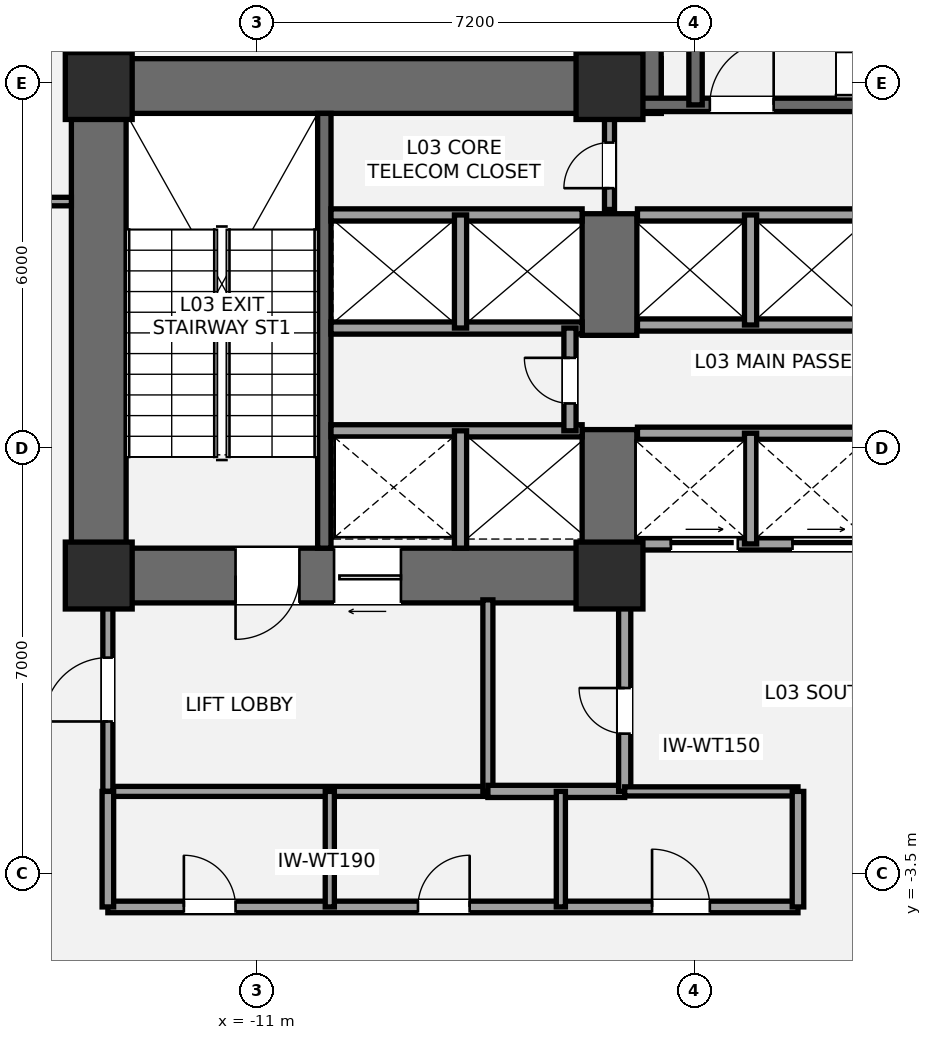
"""IFC4 building model, lengths in metres.
Left out: names, types, materials, properties, quantities, classifications, styles, units other than length and angle.
Written with IfcOpenShell. Run it as: python <this file> out.ifc"""

import sys

from ifc_helpers import new_model, si_unit, direction, frame, frame_2d, origin, origin_2d, place, context, subcontext, project, spatial, rectangle, extrude, element, fill, save


model = new_model("IFC4")
c1 = context("Model", 3, precision=1e-05, world=origin(), true_north=direction((0.0, 1.0)))
c2 = subcontext(c1, "Body", "Model", "MODEL_VIEW")
j1 = project(units=[si_unit("LENGTHUNIT", "METRE"), si_unit("PLANEANGLEUNIT", "RADIAN")], contexts=[c1])
p1 = place(None, origin())
s1 = spatial("IfcSite", under=j1, at=p1, CompositionType="ELEMENT")
p2 = place(p1, origin())
s2 = spatial("IfcBuilding", under=s1, at=p2, CompositionType="ELEMENT")
p3 = place(p2, frame((0.0, 0.0, 14.4)))
s3 = spatial("IfcBuildingStorey", under=s2, at=p3, CompositionType="ELEMENT", Elevation=14.4)
p4 = place(p3, frame((-13.6, 0.95, 0.0), z_axis=(0.0, 0.0, 1.0), x_axis=(0.0, 1.0, 0.0)))
e1 = element("IfcWall", 1, at=p4, inside=s3, PredefinedType="SHEAR", context=c2, shape_type="SweptSolid", body=[
    extrude(rectangle(XDim=8.95, YDim=0.9, at=frame_2d((4.475, 0.0))), origin(), (0.0, 0.0, 1.0), 4.2),
])
p5 = place(p3, frame((-14.05, 9.45, 0.0), z_axis=(0.0, 0.0, 1.0), x_axis=(1.0, 0.0, 0.0)))
e2 = element("IfcWall", 2, at=p5, inside=s3, PredefinedType="SHEAR", context=c2, shape_type="SweptSolid", body=[
    extrude(rectangle(XDim=9.7, YDim=0.9, at=frame_2d((4.85, 0.0))), origin(), (0.0, 0.0, 1.0), 4.2),
])
p6 = place(p3, frame((-4.75, 1.4, 0.0), z_axis=(0.0, 0.0, 1.0), x_axis=(-1.0, 0.0, 0.0)))
e3 = element("IfcWall", 3, at=p6, inside=s3, PredefinedType="SHEAR", context=c2, shape_type="SweptSolid", body=[
    extrude(rectangle(XDim=9.3, YDim=0.9, at=frame_2d((4.65, 0.0))), origin(), (0.0, 0.0, 1.0), 4.2),
])
p7 = place(p6, frame((5.55, 0.0, 0.0)))
e4 = element("IfcOpeningElement", 4, at=p7, cuts=e3, PredefinedType="OPENING", context=c2, shape_type="SweptSolid", body=[
    extrude(rectangle(XDim=1.05, YDim=2.15, at=frame_2d((0.525, 1.075))), frame((0.0, 0.46, 0.0), z_axis=(0.0, -1.0, 0.0), x_axis=(1.0, 0.0, 0.0)), (0.0, 0.0, 1.0), 0.92),
])
p8 = place(p6, frame((3.88, 0.0, 0.0)))
e5 = element("IfcOpeningElement", 5, at=p8, cuts=e3, PredefinedType="OPENING", context=c2, shape_type="SweptSolid", body=[
    extrude(rectangle(XDim=1.1, YDim=2.2, at=frame_2d((0.55, 1.1))), frame((0.0, 0.46, 0.0), z_axis=(0.0, -1.0, 0.0), x_axis=(1.0, 0.0, 0.0)), (0.0, 0.0, 1.0), 0.92),
])
p9 = place(p3, frame((-5.2, 0.95, 0.0), z_axis=(0.0, 0.0, 1.0), x_axis=(0.0, 1.0, 0.0)))
e6 = element("IfcWall", 6, at=p9, inside=s3, PredefinedType="SHEAR", context=c2, shape_type="SweptSolid", body=[
    extrude(rectangle(XDim=2.85, YDim=0.9, at=frame_2d((1.425, 0.0))), origin(), (0.0, 0.0, 1.0), 4.2),
])
p10 = place(p3, frame((-5.2, 5.35, 0.0), z_axis=(0.0, 0.0, 1.0), x_axis=(0.0, 1.0, 0.0)))
e7 = element("IfcWall", 7, at=p10, inside=s3, PredefinedType="SHEAR", context=c2, shape_type="SweptSolid", body=[
    extrude(rectangle(XDim=2.0, YDim=0.9, at=frame_2d((1.0, 0.0))), origin(), (0.0, 0.0, 1.0), 4.2),
])
p11 = place(p3, frame((-9.89, 1.85, 0.0), z_axis=(0.0, 0.0, 1.0), x_axis=(0.0, 1.0, 0.0)))
e8 = element("IfcWall", 8, at=p11, inside=s3, PredefinedType="SHEAR", context=c2, shape_type="SweptSolid", body=[
    extrude(rectangle(XDim=7.15, YDim=0.22, at=frame_2d((3.575, 0.0))), origin(), (0.0, 0.0, 1.0), 4.2),
])
p12 = place(p3, frame((-4.8, 9.0, 0.0), z_axis=(0.0, 0.0, 1.0), x_axis=(0.0, 1.0, 0.0)))
e9 = element("IfcWall", 9, at=p12, inside=s3, PredefinedType="SHEAR", context=c2, shape_type="SweptSolid", body=[
    extrude(rectangle(XDim=4.3, YDim=0.9, at=frame_2d((2.15, 0.0))), origin(), (0.0, 0.0, 1.0), 4.2),
])
p13 = place(p3, frame((-4.7, 9.14, 0.0), z_axis=(0.0, 0.0, 1.0), x_axis=(1.0, 0.0, 0.0)))
e10 = element("IfcWall", 10, at=p13, inside=s3, PredefinedType="SHEAR", context=c2, shape_type="SweptSolid", body=[
    extrude(rectangle(XDim=9.3, YDim=0.22, at=frame_2d((4.65, 0.0))), origin(), (0.0, 0.0, 1.0), 4.2),
])
p14 = place(p13, frame((1.15, 0.0, 0.0)))
e11 = element("IfcOpeningElement", 11, at=p14, cuts=e10, PredefinedType="OPENING", context=c2, shape_type="SweptSolid", body=[
    extrude(rectangle(XDim=1.05, YDim=2.15, at=frame_2d((0.525, 1.075))), frame((0.0, 0.12, 0.0), z_axis=(0.0, -1.0, 0.0), x_axis=(1.0, 0.0, 0.0)), (0.0, 0.0, 1.0), 0.24),
])
p15 = place(p3, frame((-3.785, 9.14, 0.0), z_axis=(0.0, 0.0, 1.0), x_axis=(0.0, 1.0, 0.0)))
e12 = element("IfcWall", 12, at=p15, inside=s3, PredefinedType="SHEAR", context=c2, shape_type="SweptSolid", body=[
    extrude(rectangle(XDim=3.26, YDim=0.22, at=frame_2d((1.63, 0.0))), origin(), (0.0, 0.0, 1.0), 4.2),
])
for number, where, z_axis, x_axis in (
    (13, (-13.6, 1.4, 0.0), (0.0, 0.0, 1.0), (1.0, 0.0, 0.0)),
    (14, (-13.6, 9.45, 0.0), (0.0, 0.0, 1.0), (1.0, 0.0, 0.0)),
    (15, (-5.2, 1.4, 0.0), (0.0, 0.0, 1.0), (1.0, 0.0, 0.0)),
    (16, (-5.2, 9.45, 0.0), (0.0, 0.0, 1.0), (1.0, 0.0, 0.0)),
):
    element("IfcColumn", number, at=place(p3, frame(where, z_axis=z_axis, x_axis=x_axis)), inside=s3, PredefinedType="COLUMN", context=c2, shape_type="SweptSolid", body=[
        extrude(rectangle(XDim=1.1, YDim=1.1, at=origin_2d()), origin(), (0.0, 0.0, 1.0), 4.2),
    ])
p16 = place(p3, frame((-13.45, -2.15, 0.0), z_axis=(0.0, 0.0, 1.0), x_axis=(1.0, 0.0, 0.0)))
e17 = element("IfcWall", 17, at=p16, inside=s3, PredefinedType="PARTITIONING", context=c2, shape_type="SweptSolid", body=[
    extrude(rectangle(XDim=6.25, YDim=0.165, at=frame_2d((3.125, 0.0))), origin(), (0.0, 0.0, 1.0), 3.98),
])
p17 = place(p3, frame((-13.45, -2.15, 0.0), z_axis=(0.0, 0.0, 1.0), x_axis=(0.0, 1.0, 0.0)))
e18 = element("IfcWall", 18, at=p17, inside=s3, PredefinedType="PARTITIONING", context=c2, shape_type="SweptSolid", body=[
    extrude(rectangle(XDim=3.15, YDim=0.165, at=frame_2d((1.575, 0.0))), origin(), (0.0, 0.0, 1.0), 3.433),
])
p18 = place(p17, frame((1.15, 0.0, 0.0)))
e19 = element("IfcOpeningElement", 19, at=p18, cuts=e18, PredefinedType="OPENING", context=c2, shape_type="SweptSolid", body=[
    extrude(rectangle(XDim=1.05, YDim=2.15, at=frame_2d((0.525, 1.075))), frame((0.0, 0.093, 0.0), z_axis=(0.0, -1.0, 0.0), x_axis=(1.0, 0.0, 0.0)), (0.0, 0.0, 1.0), 0.185),
])
p19 = place(p3, frame((-7.2, -2.15, 0.0), z_axis=(0.0, 0.0, 1.0), x_axis=(0.0, 1.0, 0.0)))
e20 = element("IfcWall", 20, at=p19, inside=s3, PredefinedType="PARTITIONING", context=c2, shape_type="SweptSolid", body=[
    extrude(rectangle(XDim=3.15, YDim=0.165, at=frame_2d((1.575, 0.0))), origin(), (0.0, 0.0, 1.0), 3.98),
])
p20 = place(p3, frame((-7.2, -2.15, 0.0), z_axis=(0.0, 0.0, 1.0), x_axis=(1.0, 0.0, 0.0)))
e21 = element("IfcWall", 21, at=p20, inside=s3, PredefinedType="SOLIDWALL", context=c2, shape_type="SweptSolid", body=[
    extrude(rectangle(XDim=2.25, YDim=0.2, at=frame_2d((1.125, 0.0))), origin(), (0.0, 0.0, 1.0), 3.98),
])
p21 = place(p3, frame((-4.95, -2.15, 0.0), z_axis=(0.0, 0.0, 1.0), x_axis=(0.0, 1.0, 0.0)))
e22 = element("IfcWall", 22, at=p21, inside=s3, PredefinedType="SOLIDWALL", context=c2, shape_type="SweptSolid", body=[
    extrude(rectangle(XDim=3.15, YDim=0.2, at=frame_2d((1.575, 0.0))), origin(), (0.0, 0.0, 1.0), 3.348),
])
p22 = place(p21, frame((0.95, 0.0, 0.0)))
e23 = element("IfcOpeningElement", 23, at=p22, cuts=e22, PredefinedType="OPENING", context=c2, shape_type="SweptSolid", body=[
    extrude(rectangle(XDim=0.75, YDim=2.1, at=frame_2d((0.375, 1.05))), frame((0.0, 0.11, 0.0), z_axis=(0.0, -1.0, 0.0), x_axis=(1.0, 0.0, 0.0)), (0.0, 0.0, 1.0), 0.22),
])
p23 = place(p3, frame((-9.78, 3.78, 0.0), z_axis=(0.0, 0.0, 1.0), x_axis=(1.0, 0.0, 0.0)))
e24 = element("IfcWall", 24, at=p23, inside=s3, PredefinedType="SOLIDWALL", context=c2, shape_type="SweptSolid", body=[
    extrude(rectangle(XDim=4.13, YDim=0.2, at=frame_2d((2.065, 0.0))), origin(), (0.0, 0.0, 1.0), 3.98),
])
p24 = place(p3, frame((-7.65, 1.85, 0.0), z_axis=(0.0, 0.0, 1.0), x_axis=(0.0, 1.0, 0.0)))
e25 = element("IfcWall", 25, at=p24, inside=s3, PredefinedType="SOLIDWALL", context=c2, shape_type="SweptSolid", body=[
    extrude(rectangle(XDim=1.93, YDim=0.2, at=frame_2d((0.965, 0.0))), origin(), (0.0, 0.0, 1.0), 3.98),
])
for number, where, z_axis, x_axis in (
    (26, (-9.78, 5.47, 0.0), (0.0, 0.0, 1.0), (1.0, 0.0, 0.0)),
    (27, (-9.78, 7.33, 0.0), (0.0, 0.0, 1.0), (1.0, 0.0, 0.0)),
):
    element("IfcWall", number, at=place(p3, frame(where, z_axis=z_axis, x_axis=x_axis)), inside=s3, PredefinedType="SOLIDWALL", context=c2, shape_type="SweptSolid", body=[
        extrude(rectangle(XDim=4.13, YDim=0.2, at=frame_2d((2.065, 0.0))), origin(), (0.0, 0.0, 1.0), 3.98),
    ])
p25 = place(p3, frame((-7.65, 5.47, 0.0), z_axis=(0.0, 0.0, 1.0), x_axis=(0.0, 1.0, 0.0)))
e28 = element("IfcWall", 28, at=p25, inside=s3, PredefinedType="SOLIDWALL", context=c2, shape_type="SweptSolid", body=[
    extrude(rectangle(XDim=1.86, YDim=0.2, at=frame_2d((0.93, 0.0))), origin(), (0.0, 0.0, 1.0), 3.98),
])
p26 = place(p3, frame((-5.85, 3.78, 0.0), z_axis=(0.0, 0.0, 1.0), x_axis=(0.0, 1.0, 0.0)))
e29 = element("IfcWall", 29, at=p26, inside=s3, PredefinedType="SOLIDWALL", context=c2, shape_type="SweptSolid", body=[
    extrude(rectangle(XDim=1.69, YDim=0.2, at=frame_2d((0.845, 0.0))), origin(), (0.0, 0.0, 1.0), 3.98),
])
p27 = place(p26, frame((0.45, 0.0, 0.0)))
e30 = element("IfcOpeningElement", 30, at=p27, cuts=e29, PredefinedType="OPENING", context=c2, shape_type="SweptSolid", body=[
    extrude(rectangle(XDim=0.75, YDim=2.1, at=frame_2d((0.375, 1.05))), frame((0.0, 0.11, 0.0), z_axis=(0.0, -1.0, 0.0), x_axis=(1.0, 0.0, 0.0)), (0.0, 0.0, 1.0), 0.22),
])
p28 = place(p3, frame((-4.74, 1.92, 0.0), z_axis=(0.0, 0.0, 1.0), x_axis=(1.0, 0.0, 0.0)))
e31 = element("IfcWall", 31, at=p28, inside=s3, PredefinedType="SOLIDWALL", context=c2, shape_type="SweptSolid", body=[
    extrude(rectangle(XDim=3.86, YDim=0.2, at=frame_2d((1.93, 0.0))), origin(), (0.0, 0.0, 1.0), 2.97),
])
p29 = place(p28, frame((0.55, 0.0, 0.0)))
e32 = element("IfcOpeningElement", 32, at=p29, cuts=e31, PredefinedType="OPENING", context=c2, shape_type="SweptSolid", body=[
    extrude(rectangle(XDim=1.1, YDim=2.2, at=frame_2d((0.55, 1.1))), frame((0.0, 0.11, 0.0), z_axis=(0.0, -1.0, 0.0), x_axis=(1.0, 0.0, 0.0)), (0.0, 0.0, 1.0), 0.22),
])
p30 = place(p28, frame((2.55, 0.0, 0.0)))
e33 = element("IfcOpeningElement", 33, at=p30, cuts=e31, PredefinedType="OPENING", context=c2, shape_type="SweptSolid", body=[
    extrude(rectangle(XDim=1.1, YDim=2.2, at=frame_2d((0.55, 1.1))), frame((0.0, 0.11, 0.0), z_axis=(0.0, -1.0, 0.0), x_axis=(1.0, 0.0, 0.0)), (0.0, 0.0, 1.0), 0.22),
])
p31 = place(p3, frame((-4.74, 3.74, 0.0), z_axis=(0.0, 0.0, 1.0), x_axis=(1.0, 0.0, 0.0)))
e34 = element("IfcWall", 34, at=p31, inside=s3, PredefinedType="SOLIDWALL", context=c2, shape_type="SweptSolid", body=[
    extrude(rectangle(XDim=3.86, YDim=0.2, at=frame_2d((1.93, 0.0))), origin(), (0.0, 0.0, 1.0), 3.98),
])
p32 = place(p3, frame((-2.88, 1.92, 0.0), z_axis=(0.0, 0.0, 1.0), x_axis=(0.0, 1.0, 0.0)))
e35 = element("IfcWall", 35, at=p32, inside=s3, PredefinedType="SOLIDWALL", context=c2, shape_type="SweptSolid", body=[
    extrude(rectangle(XDim=1.82, YDim=0.2, at=frame_2d((0.91, 0.0))), origin(), (0.0, 0.0, 1.0), 3.98),
])
for number, where, z_axis, x_axis in (
    (36, (-4.74, 5.52, 0.0), (0.0, 0.0, 1.0), (1.0, 0.0, 0.0)),
    (37, (-4.74, 7.33, 0.0), (0.0, 0.0, 1.0), (1.0, 0.0, 0.0)),
):
    element("IfcWall", number, at=place(p3, frame(where, z_axis=z_axis, x_axis=x_axis)), inside=s3, PredefinedType="SOLIDWALL", context=c2, shape_type="SweptSolid", body=[
        extrude(rectangle(XDim=3.86, YDim=0.2, at=frame_2d((1.93, 0.0))), origin(), (0.0, 0.0, 1.0), 3.98),
    ])
p33 = place(p3, frame((-2.88, 5.52, 0.0), z_axis=(0.0, 0.0, 1.0), x_axis=(0.0, 1.0, 0.0)))
e38 = element("IfcWall", 38, at=p33, inside=s3, PredefinedType="SOLIDWALL", context=c2, shape_type="SweptSolid", body=[
    extrude(rectangle(XDim=1.81, YDim=0.2, at=frame_2d((0.905, 0.0))), origin(), (0.0, 0.0, 1.0), 3.98),
])
p34 = place(p3, frame((-5.2, 7.42, 0.0), z_axis=(0.0, 0.0, 1.0), x_axis=(0.0, 1.0, 0.0)))
e39 = element("IfcWall", 39, at=p34, inside=s3, PredefinedType="PARTITIONING", context=c2, shape_type="SweptSolid", body=[
    extrude(rectangle(XDim=1.58, YDim=0.165, at=frame_2d((0.79, 0.0))), origin(), (0.0, 0.0, 1.0), 3.98),
])
p35 = place(p34, frame((0.35, 0.0, 0.0)))
e40 = element("IfcOpeningElement", 40, at=p35, cuts=e39, PredefinedType="OPENING", context=c2, shape_type="SweptSolid", body=[
    extrude(rectangle(XDim=0.75, YDim=2.1, at=frame_2d((0.375, 1.05))), frame((0.0, 0.093, 0.0), z_axis=(0.0, -1.0, 0.0), x_axis=(1.0, 0.0, 0.0)), (0.0, 0.0, 1.0), 0.185),
])
p36 = place(p3, frame((-13.45, -4.05, 0.0), z_axis=(0.0, 0.0, 1.0), x_axis=(1.0, 0.0, 0.0)))
e41 = element("IfcWall", 41, at=p36, inside=s3, PredefinedType="PLUMBINGWALL", context=c2, shape_type="SweptSolid", body=[
    extrude(rectangle(XDim=11.35, YDim=0.19, at=frame_2d((5.675, 0.0))), origin(), (0.0, 0.0, 1.0), 3.507),
])
p37 = place(p36, frame((1.25, 0.0, 0.0)))
e42 = element("IfcOpeningElement", 42, at=p37, cuts=e41, PredefinedType="OPENING", context=c2, shape_type="SweptSolid", body=[
    extrude(rectangle(XDim=0.85, YDim=2.1, at=frame_2d((0.425, 1.05))), frame((0.0, 0.105, 0.0), z_axis=(0.0, -1.0, 0.0), x_axis=(1.0, 0.0, 0.0)), (0.0, 0.0, 1.0), 0.21),
])
p38 = place(p36, frame((5.1, 0.0, 0.0)))
e43 = element("IfcOpeningElement", 43, at=p38, cuts=e41, PredefinedType="OPENING", context=c2, shape_type="SweptSolid", body=[
    extrude(rectangle(XDim=0.85, YDim=2.1, at=frame_2d((0.425, 1.05))), frame((0.0, 0.105, 0.0), z_axis=(0.0, -1.0, 0.0), x_axis=(1.0, 0.0, 0.0)), (0.0, 0.0, 1.0), 0.21),
])
p39 = place(p36, frame((8.95, 0.0, 0.0)))
e44 = element("IfcOpeningElement", 44, at=p39, cuts=e41, PredefinedType="OPENING", context=c2, shape_type="SweptSolid", body=[
    extrude(rectangle(XDim=0.95, YDim=2.15, at=frame_2d((0.475, 1.075))), frame((0.0, 0.105, 0.0), z_axis=(0.0, -1.0, 0.0), x_axis=(1.0, 0.0, 0.0)), (0.0, 0.0, 1.0), 0.21),
])
p40 = place(p3, frame((-4.95, -2.15, 0.0), z_axis=(0.0, 0.0, 1.0), x_axis=(1.0, 0.0, 0.0)))
e45 = element("IfcWall", 45, at=p40, inside=s3, PredefinedType="PLUMBINGWALL", context=c2, shape_type="SweptSolid", body=[
    extrude(rectangle(XDim=2.85, YDim=0.15, at=frame_2d((1.425, 0.0))), origin(), (0.0, 0.0, 1.0), 3.98),
])
for number, where, z_axis, x_axis in (
    (46, (-13.45, -4.05, 0.0), (0.0, 0.0, 1.0), (0.0, 1.0, 0.0)),
    (47, (-2.1, -4.05, 0.0), (0.0, 0.0, 1.0), (0.0, 1.0, 0.0)),
):
    element("IfcWall", number, at=place(p3, frame(where, z_axis=z_axis, x_axis=x_axis)), inside=s3, PredefinedType="PLUMBINGWALL", context=c2, shape_type="SweptSolid", body=[
        extrude(rectangle(XDim=1.9, YDim=0.19, at=frame_2d((0.95, 0.0))), origin(), (0.0, 0.0, 1.0), 3.98),
    ])
p41 = place(p3, frame((-9.8, -4.05, 0.0), z_axis=(0.0, 0.0, 1.0), x_axis=(0.0, 1.0, 0.0)))
e48 = element("IfcWall", 48, at=p41, inside=s3, PredefinedType="PLUMBINGWALL", context=c2, shape_type="SweptSolid", body=[
    extrude(rectangle(XDim=1.9, YDim=0.15, at=frame_2d((0.95, 0.0))), origin(), (0.0, 0.0, 1.0), 3.98),
])
p42 = place(p3, frame((-6.0, -4.05, 0.0), z_axis=(0.0, 0.0, 1.0), x_axis=(0.0, 1.0, 0.0)))
e49 = element("IfcWall", 49, at=p42, inside=s3, PredefinedType="PLUMBINGWALL", context=c2, shape_type="SweptSolid", body=[
    extrude(rectangle(XDim=1.9, YDim=0.15, at=frame_2d((0.95, 0.0))), origin(), (0.0, 0.0, 1.0), 3.348),
])
p43 = place(p3, frame((-18.6, 7.55, 0.0), z_axis=(0.0, 0.0, 1.0), x_axis=(1.0, 0.0, 0.0)))
e50 = element("IfcWall", 50, at=p43, inside=s3, PredefinedType="PARTITIONING", context=c2, shape_type="SweptSolid", body=[
    extrude(rectangle(XDim=4.55, YDim=0.14, at=frame_2d((2.275, 0.0))), origin(), (0.0, 0.0, 1.0), 3.433),
])
p44 = place(p43, frame((0.32, 0.0, 0.0)))
e51 = element("IfcOpeningElement", 51, at=p44, cuts=e50, PredefinedType="OPENING", context=c2, shape_type="SweptSolid", body=[
    extrude(rectangle(XDim=0.92, YDim=2.15, at=frame_2d((0.46, 1.075))), frame((0.0, 0.08, 0.0), z_axis=(0.0, -1.0, 0.0), x_axis=(1.0, 0.0, 0.0)), (0.0, 0.0, 1.0), 0.16),
])
p45 = place(p7, origin())
e52 = element("IfcDoor", 52, at=p45, inside=s3, OperationType="SINGLE_SWING_RIGHT", PredefinedType="DOOR", context=c2, shape_type="SweptSolid", body=[
    extrude(rectangle(XDim=1.05, YDim=2.15, at=frame_2d((0.525, 1.075))), frame((0.0, 0.025, 0.0), z_axis=(0.0, -1.0, 0.0), x_axis=(1.0, 0.0, 0.0)), (0.0, 0.0, 1.0), 0.05),
])
fill(e4, e52)
p46 = place(p14, origin())
e53 = element("IfcDoor", 53, at=p46, inside=s3, OperationType="SINGLE_SWING_RIGHT", PredefinedType="DOOR", context=c2, shape_type="SweptSolid", body=[
    extrude(rectangle(XDim=1.05, YDim=2.15, at=frame_2d((0.525, 1.075))), frame((0.0, 0.025, 0.0), z_axis=(0.0, -1.0, 0.0), x_axis=(1.0, 0.0, 0.0)), (0.0, 0.0, 1.0), 0.05),
])
fill(e11, e53)
p47 = place(p18, origin())
e54 = element("IfcDoor", 54, at=p47, inside=s3, OperationType="SINGLE_SWING_LEFT", PredefinedType="DOOR", context=c2, shape_type="SweptSolid", body=[
    extrude(rectangle(XDim=1.05, YDim=2.15, at=frame_2d((0.525, 1.075))), frame((0.0, 0.025, 0.0), z_axis=(0.0, -1.0, 0.0), x_axis=(1.0, 0.0, 0.0)), (0.0, 0.0, 1.0), 0.05),
])
fill(e19, e54)
p48 = place(p22, origin())
e55 = element("IfcDoor", 55, at=p48, inside=s3, OperationType="SINGLE_SWING_RIGHT", PredefinedType="DOOR", context=c2, shape_type="SweptSolid", body=[
    extrude(rectangle(XDim=0.75, YDim=2.1, at=frame_2d((0.375, 1.05))), frame((0.0, 0.025, 0.0), z_axis=(0.0, -1.0, 0.0), x_axis=(1.0, 0.0, 0.0)), (0.0, 0.0, 1.0), 0.05),
])
fill(e23, e55)
p49 = place(p8, origin())
e56 = element("IfcDoor", 56, at=p49, inside=s3, OperationType="SLIDING_TO_LEFT", PredefinedType="DOOR", context=c2, shape_type="SweptSolid", body=[
    extrude(rectangle(XDim=1.1, YDim=2.2, at=frame_2d((0.55, 1.1))), frame((0.0, 0.025, 0.0), z_axis=(0.0, -1.0, 0.0), x_axis=(1.0, 0.0, 0.0)), (0.0, 0.0, 1.0), 0.05),
])
fill(e5, e56)
p50 = place(p27, origin())
e57 = element("IfcDoor", 57, at=p50, inside=s3, OperationType="SINGLE_SWING_RIGHT", PredefinedType="DOOR", context=c2, shape_type="SweptSolid", body=[
    extrude(rectangle(XDim=0.75, YDim=2.1, at=frame_2d((0.375, 1.05))), frame((0.0, 0.025, 0.0), z_axis=(0.0, -1.0, 0.0), x_axis=(1.0, 0.0, 0.0)), (0.0, 0.0, 1.0), 0.05),
])
fill(e30, e57)
p51 = place(p29, origin())
e58 = element("IfcDoor", 58, at=p51, inside=s3, OperationType="SLIDING_TO_LEFT", PredefinedType="DOOR", context=c2, shape_type="SweptSolid", body=[
    extrude(rectangle(XDim=1.1, YDim=2.2, at=frame_2d((0.55, 1.1))), frame((0.0, 0.025, 0.0), z_axis=(0.0, -1.0, 0.0), x_axis=(1.0, 0.0, 0.0)), (0.0, 0.0, 1.0), 0.05),
])
fill(e32, e58)
p52 = place(p30, origin())
e59 = element("IfcDoor", 59, at=p52, inside=s3, OperationType="SLIDING_TO_LEFT", PredefinedType="DOOR", context=c2, shape_type="SweptSolid", body=[
    extrude(rectangle(XDim=1.1, YDim=2.2, at=frame_2d((0.55, 1.1))), frame((0.0, 0.025, 0.0), z_axis=(0.0, -1.0, 0.0), x_axis=(1.0, 0.0, 0.0)), (0.0, 0.0, 1.0), 0.05),
])
fill(e33, e59)
p53 = place(p35, origin())
e60 = element("IfcDoor", 60, at=p53, inside=s3, OperationType="SINGLE_SWING_LEFT", PredefinedType="DOOR", context=c2, shape_type="SweptSolid", body=[
    extrude(rectangle(XDim=0.75, YDim=2.1, at=frame_2d((0.375, 1.05))), frame((0.0, 0.025, 0.0), z_axis=(0.0, -1.0, 0.0), x_axis=(1.0, 0.0, 0.0)), (0.0, 0.0, 1.0), 0.05),
])
fill(e40, e60)
p54 = place(p37, origin())
e61 = element("IfcDoor", 61, at=p54, inside=s3, OperationType="SINGLE_SWING_LEFT", PredefinedType="DOOR", context=c2, shape_type="SweptSolid", body=[
    extrude(rectangle(XDim=0.85, YDim=2.1, at=frame_2d((0.425, 1.05))), frame((0.0, 0.025, 0.0), z_axis=(0.0, -1.0, 0.0), x_axis=(1.0, 0.0, 0.0)), (0.0, 0.0, 1.0), 0.05),
])
fill(e42, e61)
p55 = place(p38, origin())
e62 = element("IfcDoor", 62, at=p55, inside=s3, OperationType="SINGLE_SWING_RIGHT", PredefinedType="DOOR", context=c2, shape_type="SweptSolid", body=[
    extrude(rectangle(XDim=0.85, YDim=2.1, at=frame_2d((0.425, 1.05))), frame((0.0, 0.025, 0.0), z_axis=(0.0, -1.0, 0.0), x_axis=(1.0, 0.0, 0.0)), (0.0, 0.0, 1.0), 0.05),
])
fill(e43, e62)
p56 = place(p39, origin())
e63 = element("IfcDoor", 63, at=p56, inside=s3, OperationType="SINGLE_SWING_LEFT", PredefinedType="DOOR", context=c2, shape_type="SweptSolid", body=[
    extrude(rectangle(XDim=0.95, YDim=2.15, at=frame_2d((0.475, 1.075))), frame((0.0, 0.025, 0.0), z_axis=(0.0, -1.0, 0.0), x_axis=(1.0, 0.0, 0.0)), (0.0, 0.0, 1.0), 0.05),
])
fill(e44, e63)
save(model, sys.argv[1])
